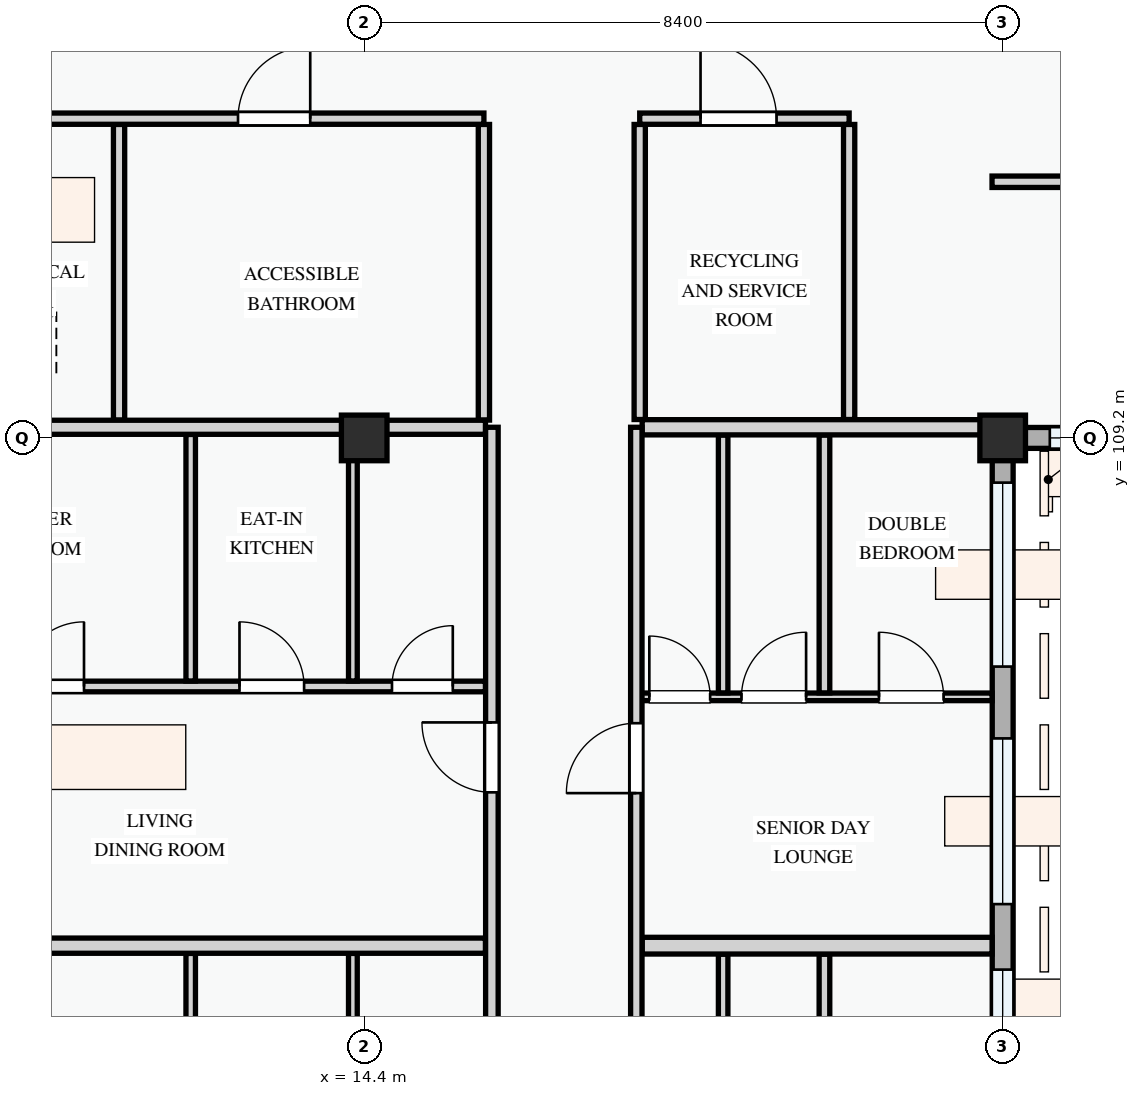
"""IFC4 building model, lengths in metres.
Left out: names, types, materials, properties, quantities, classifications, styles, units other than length and angle.
Written with IfcOpenShell. Run it as: python <this file> out.ifc"""

import sys

from ifc_helpers import new_model, si_unit, direction, frame, frame_2d, origin, origin_2d, place, context, subcontext, project, spatial, rectangle, extrude, element, fill, save


model = new_model("IFC4")
c1 = context("Model", 3, precision=1e-05, world=origin(), true_north=direction((0.0, 1.0)))
c2 = subcontext(c1, "Body", "Model", "MODEL_VIEW")
j1 = project(units=[si_unit("LENGTHUNIT", "METRE"), si_unit("PLANEANGLEUNIT", "RADIAN")], contexts=[c1])
p1 = place(None, origin())
s1 = spatial("IfcSite", under=j1, at=p1, CompositionType="ELEMENT")
p2 = place(p1, origin())
s2 = spatial("IfcBuilding", under=s1, at=p2, CompositionType="ELEMENT")
p3 = place(p2, frame((0.0, 0.0, 31.2)))
s3 = spatial("IfcBuildingStorey", under=s2, at=p3, CompositionType="ELEMENT", Elevation=31.2)
for number, where, z_axis, x_axis in (
    (1, (14.4, 109.2, 0.0), (0.0, 0.0, 1.0), (1.0, 0.0, 0.0)),
    (2, (22.8, 109.2, 0.0), (0.0, 0.0, 1.0), (1.0, 0.0, 0.0)),
):
    element("IfcColumn", number, at=place(p3, frame(where, z_axis=z_axis, x_axis=x_axis)), inside=s3, PredefinedType="COLUMN", context=c2, shape_type="SweptSolid", body=[
        extrude(rectangle(XDim=0.6, YDim=0.6, at=origin_2d()), origin(), (0.0, 0.0, 1.0), 3.3),
    ])
p4 = place(p3, frame((22.8, 109.2, 0.0), z_axis=(0.0, 0.0, 1.0), x_axis=(1.0, 0.0, 0.0)))
e3 = element("IfcWall", 3, at=p4, inside=s3, PredefinedType="STANDARD", context=c2, shape_type="SweptSolid", body=[
    extrude(rectangle(XDim=6.0, YDim=0.275, at=frame_2d((3.0, 0.0))), origin(), (0.0, 0.0, 1.0), 2.525),
])
p5 = place(p4, frame((0.62, 0.0, 0.78)))
e4 = element("IfcOpeningElement", 4, at=p5, cuts=e3, PredefinedType="OPENING", context=c2, shape_type="SweptSolid", body=[
    extrude(rectangle(XDim=1.3, YDim=1.4, at=frame_2d((0.65, 0.7))), frame((0.0, 0.147, 0.0), z_axis=(0.0, -1.0, 0.0), x_axis=(1.0, 0.0, 0.0)), (0.0, 0.0, 1.0), 0.295),
])
p6 = place(p4, frame((3.155, 0.0, 0.78)))
e5 = element("IfcOpeningElement", 5, at=p6, cuts=e3, PredefinedType="OPENING", context=c2, shape_type="SweptSolid", body=[
    extrude(rectangle(XDim=1.85, YDim=1.6, at=frame_2d((0.925, 0.8))), frame((0.0, 0.147, 0.0), z_axis=(0.0, -1.0, 0.0), x_axis=(1.0, 0.0, 0.0)), (0.0, 0.0, 1.0), 0.295),
])
p7 = place(p3, frame((22.8, 100.8, 0.0), z_axis=(0.0, 0.0, 1.0), x_axis=(0.0, 1.0, 0.0)))
e6 = element("IfcWall", 6, at=p7, inside=s3, PredefinedType="STANDARD", context=c2, shape_type="SweptSolid", body=[
    extrude(rectangle(XDim=8.4, YDim=0.275, at=frame_2d((4.2, 0.0))), origin(), (0.0, 0.0, 1.0), 2.425),
])
p8 = place(p7, frame((0.505, 0.0, 0.78)))
e7 = element("IfcOpeningElement", 7, at=p8, cuts=e6, PredefinedType="OPENING", context=c2, shape_type="SweptSolid", body=[
    extrude(rectangle(XDim=0.9, YDim=1.2, at=frame_2d((0.45, 0.6))), frame((0.0, 0.147, 0.0), z_axis=(0.0, -1.0, 0.0), x_axis=(1.0, 0.0, 0.0)), (0.0, 0.0, 1.0), 0.295),
])
p9 = place(p7, frame((2.267, 0.0, 0.78)))
e8 = element("IfcOpeningElement", 8, at=p9, cuts=e6, PredefinedType="OPENING", context=c2, shape_type="SweptSolid", body=[
    extrude(rectangle(XDim=2.18, YDim=1.48, at=frame_2d((1.09, 0.74))), frame((0.0, 0.147, 0.0), z_axis=(0.0, -1.0, 0.0), x_axis=(1.0, 0.0, 0.0)), (0.0, 0.0, 1.0), 0.295),
])
p10 = place(p7, frame((5.392, 0.0, 0.78)))
e9 = element("IfcOpeningElement", 9, at=p10, cuts=e6, PredefinedType="OPENING", context=c2, shape_type="SweptSolid", body=[
    extrude(rectangle(XDim=2.42, YDim=1.52, at=frame_2d((1.21, 0.76))), frame((0.0, 0.147, 0.0), z_axis=(0.0, -1.0, 0.0), x_axis=(1.0, 0.0, 0.0)), (0.0, 0.0, 1.0), 0.295),
])
for number, where, z_axis, x_axis in (
    (10, (11.175, 113.324, 0.0), (0.0, 0.0, 1.0), (0.0, -1.0, 0.0)),
    (11, (15.975, 113.324, 0.0), (0.0, 0.0, 1.0), (0.0, -1.0, 0.0)),
):
    element("IfcWall", number, at=place(p3, frame(where, z_axis=z_axis, x_axis=x_axis)), inside=s3, PredefinedType="PARTITIONING", context=c2, shape_type="SweptSolid", body=[
        extrude(rectangle(XDim=3.889, YDim=0.148, at=frame_2d((1.945, 0.0))), origin(), (0.0, 0.0, 1.0), 3.0),
    ])
for number, where, z_axis, x_axis in (
    (12, (18.025, 113.324, 0.0), (0.0, 0.0, 1.0), (0.0, -1.0, 0.0)),
    (13, (20.78, 113.324, 0.0), (0.0, 0.0, 1.0), (0.0, -1.0, 0.0)),
):
    element("IfcWall", number, at=place(p3, frame(where, z_axis=z_axis, x_axis=x_axis)), inside=s3, PredefinedType="PARTITIONING", context=c2, shape_type="SweptSolid", body=[
        extrude(rectangle(XDim=3.882, YDim=0.148, at=frame_2d((1.941, 0.0))), origin(), (0.0, 0.0, 1.0), 3.0),
    ])
p11 = place(p3, frame((8.54, 113.4, 0.0), z_axis=(0.0, 0.0, 1.0), x_axis=(1.0, 0.0, 0.0)))
e14 = element("IfcWall", 14, at=p11, inside=s3, PredefinedType="PARTITIONING", context=c2, shape_type="SweptSolid", body=[
    extrude(rectangle(XDim=7.435, YDim=0.148, at=frame_2d((3.718, 0.0))), origin(), (0.0, 0.0, 1.0), 3.0),
])
p12 = place(p11, frame((0.65, 0.0, 0.0)))
e15 = element("IfcOpeningElement", 15, at=p12, cuts=e14, PredefinedType="OPENING", context=c2, shape_type="SweptSolid", body=[
    extrude(rectangle(XDim=0.9, YDim=2.1, at=frame_2d((0.45, 1.05))), frame((0.0, 0.084, 0.0), z_axis=(0.0, -1.0, 0.0), x_axis=(1.0, 0.0, 0.0)), (0.0, 0.0, 1.0), 0.168),
])
p13 = place(p11, frame((4.2, 0.0, 0.0)))
e16 = element("IfcOpeningElement", 16, at=p13, cuts=e14, PredefinedType="OPENING", context=c2, shape_type="SweptSolid", body=[
    extrude(rectangle(XDim=0.95, YDim=2.1, at=frame_2d((0.475, 1.05))), frame((0.0, 0.084, 0.0), z_axis=(0.0, -1.0, 0.0), x_axis=(1.0, 0.0, 0.0)), (0.0, 0.0, 1.0), 0.168),
])
p14 = place(p3, frame((18.025, 113.4, 0.0), z_axis=(0.0, 0.0, 1.0), x_axis=(1.0, 0.0, 0.0)))
e17 = element("IfcWall", 17, at=p14, inside=s3, PredefinedType="PARTITIONING", context=c2, shape_type="SweptSolid", body=[
    extrude(rectangle(XDim=2.755, YDim=0.148, at=frame_2d((1.377, 0.0))), origin(), (0.0, 0.0, 1.0), 3.0),
])
p15 = place(p14, frame((0.8, 0.0, 0.0)))
e18 = element("IfcOpeningElement", 18, at=p15, cuts=e17, PredefinedType="OPENING", context=c2, shape_type="SweptSolid", body=[
    extrude(rectangle(XDim=1.0, YDim=2.15, at=frame_2d((0.5, 1.075))), frame((0.0, 0.084, 0.0), z_axis=(0.0, -1.0, 0.0), x_axis=(1.0, 0.0, 0.0)), (0.0, 0.0, 1.0), 0.168),
])
p16 = place(p3, frame((22.66, 112.57, 0.0), z_axis=(0.0, 0.0, 1.0), x_axis=(1.0, 0.0, 0.0)))
e19 = element("IfcWall", 19, at=p16, inside=s3, PredefinedType="PARTITIONING", context=c2, shape_type="SweptSolid", body=[
    extrude(rectangle(XDim=2.406, YDim=0.15, at=frame_2d((1.203, 0.0))), origin(), (0.0, 0.0, 1.0), 3.0),
])
p17 = place(p3, frame((12.118, 97.852, 0.0), z_axis=(0.0, 0.0, 1.0), x_axis=(0.0, 1.0, 0.0)))
e20 = element("IfcWall", 20, at=p17, inside=s3, PredefinedType="PARTITIONING", context=c2, shape_type="SweptSolid", body=[
    extrude(rectangle(XDim=4.566, YDim=0.125, at=frame_2d((2.283, 0.0))), origin(), (0.0, 0.0, 1.0), 3.0),
])
p18 = place(p3, frame((14.251, 97.852, 0.0), z_axis=(0.0, 0.0, 1.0), x_axis=(0.0, 1.0, 0.0)))
e21 = element("IfcWall", 21, at=p18, inside=s3, PredefinedType="PARTITIONING", context=c2, shape_type="SweptSolid", body=[
    extrude(rectangle(XDim=4.566, YDim=0.115, at=frame_2d((2.283, 0.0))), origin(), (0.0, 0.0, 1.0), 2.425),
])
p19 = place(p3, frame((20.455, 97.642, 0.0), z_axis=(0.0, 0.0, 1.0), x_axis=(0.0, 1.0, 0.0)))
e22 = element("IfcWall", 22, at=p19, inside=s3, PredefinedType="PARTITIONING", context=c2, shape_type="SweptSolid", body=[
    extrude(rectangle(XDim=4.766, YDim=0.14, at=frame_2d((2.383, 0.0))), origin(), (0.0, 0.0, 1.0), 3.0),
])
p20 = place(p3, frame((19.122, 97.642, 0.0), z_axis=(0.0, 0.0, 1.0), x_axis=(0.0, 1.0, 0.0)))
e23 = element("IfcWall", 23, at=p20, inside=s3, PredefinedType="PARTITIONING", context=c2, shape_type="SweptSolid", body=[
    extrude(rectangle(XDim=4.766, YDim=0.125, at=frame_2d((2.383, 0.0))), origin(), (0.0, 0.0, 1.0), 3.0),
])
p21 = place(p3, frame((8.54, 105.93, 0.0), z_axis=(0.0, 0.0, 1.0), x_axis=(1.0, 0.0, 0.0)))
e24 = element("IfcWall", 24, at=p21, inside=s3, PredefinedType="PARTITIONING", context=c2, shape_type="SweptSolid", body=[
    extrude(rectangle(XDim=7.456, YDim=0.14, at=frame_2d((3.728, 0.0))), origin(), (0.0, 0.0, 1.0), 3.0),
])
p22 = place(p21, frame((1.324, 0.0, 0.0)))
e25 = element("IfcOpeningElement", 25, at=p22, cuts=e24, PredefinedType="OPENING", context=c2, shape_type="SweptSolid", body=[
    extrude(rectangle(XDim=0.85, YDim=2.1, at=frame_2d((0.425, 1.05))), frame((0.0, 0.08, 0.0), z_axis=(0.0, -1.0, 0.0), x_axis=(1.0, 0.0, 0.0)), (0.0, 0.0, 1.0), 0.16),
])
p23 = place(p21, frame((4.22, 0.0, 0.0)))
e26 = element("IfcOpeningElement", 26, at=p23, cuts=e24, PredefinedType="OPENING", context=c2, shape_type="SweptSolid", body=[
    extrude(rectangle(XDim=0.85, YDim=2.1, at=frame_2d((0.425, 1.05))), frame((0.0, 0.08, 0.0), z_axis=(0.0, -1.0, 0.0), x_axis=(1.0, 0.0, 0.0)), (0.0, 0.0, 1.0), 0.16),
])
p24 = place(p21, frame((6.226, 0.0, 0.0)))
e27 = element("IfcOpeningElement", 27, at=p24, cuts=e24, PredefinedType="OPENING", context=c2, shape_type="SweptSolid", body=[
    extrude(rectangle(XDim=0.8, YDim=2.1, at=frame_2d((0.4, 1.05))), frame((0.0, 0.08, 0.0), z_axis=(0.0, -1.0, 0.0), x_axis=(1.0, 0.0, 0.0)), (0.0, 0.0, 1.0), 0.16),
])
p25 = place(p3, frame((12.118, 106.002, 0.0), z_axis=(0.0, 0.0, 1.0), x_axis=(0.0, 1.0, 0.0)))
e28 = element("IfcWall", 28, at=p25, inside=s3, PredefinedType="PARTITIONING", context=c2, shape_type="SweptSolid", body=[
    extrude(rectangle(XDim=3.244, YDim=0.125, at=frame_2d((1.622, 0.0))), origin(), (0.0, 0.0, 1.0), 3.0),
])
p26 = place(p3, frame((14.251, 106.002, 0.0), z_axis=(0.0, 0.0, 1.0), x_axis=(0.0, 1.0, 0.0)))
e29 = element("IfcWall", 29, at=p26, inside=s3, PredefinedType="PARTITIONING", context=c2, shape_type="SweptSolid", body=[
    extrude(rectangle(XDim=3.244, YDim=0.115, at=frame_2d((1.622, 0.0))), origin(), (0.0, 0.0, 1.0), 2.425),
])
p27 = place(p3, frame((17.98, 105.794, 0.0), z_axis=(0.0, 0.0, 1.0), x_axis=(1.0, 0.0, 0.0)))
e30 = element("IfcWall", 30, at=p27, inside=s3, PredefinedType="PARTITIONING", context=c2, shape_type="SweptSolid", body=[
    extrude(rectangle(XDim=4.68, YDim=0.1, at=frame_2d((2.34, 0.0))), origin(), (0.0, 0.0, 1.0), 3.0),
])
p28 = place(p27, frame((0.171, 0.0, 0.0)))
e31 = element("IfcOpeningElement", 31, at=p28, cuts=e30, PredefinedType="OPENING", context=c2, shape_type="SweptSolid", body=[
    extrude(rectangle(XDim=0.8, YDim=2.1, at=frame_2d((0.4, 1.05))), frame((0.0, 0.06, 0.0), z_axis=(0.0, -1.0, 0.0), x_axis=(1.0, 0.0, 0.0)), (0.0, 0.0, 1.0), 0.12),
])
p29 = place(p27, frame((1.384, 0.0, 0.0)))
e32 = element("IfcOpeningElement", 32, at=p29, cuts=e30, PredefinedType="OPENING", context=c2, shape_type="SweptSolid", body=[
    extrude(rectangle(XDim=0.85, YDim=2.1, at=frame_2d((0.425, 1.05))), frame((0.0, 0.06, 0.0), z_axis=(0.0, -1.0, 0.0), x_axis=(1.0, 0.0, 0.0)), (0.0, 0.0, 1.0), 0.12),
])
p30 = place(p27, frame((3.193, 0.0, 0.0)))
e33 = element("IfcOpeningElement", 33, at=p30, cuts=e30, PredefinedType="OPENING", context=c2, shape_type="SweptSolid", body=[
    extrude(rectangle(XDim=0.85, YDim=2.1, at=frame_2d((0.425, 1.05))), frame((0.0, 0.06, 0.0), z_axis=(0.0, -1.0, 0.0), x_axis=(1.0, 0.0, 0.0)), (0.0, 0.0, 1.0), 0.12),
])
p31 = place(p3, frame((20.455, 105.846, 0.0), z_axis=(0.0, 0.0, 1.0), x_axis=(0.0, 1.0, 0.0)))
e34 = element("IfcWall", 34, at=p31, inside=s3, PredefinedType="PARTITIONING", context=c2, shape_type="SweptSolid", body=[
    extrude(rectangle(XDim=3.392, YDim=0.14, at=frame_2d((1.696, 0.0))), origin(), (0.0, 0.0, 1.0), 3.0),
])
p32 = place(p3, frame((19.122, 105.846, 0.0), z_axis=(0.0, 0.0, 1.0), x_axis=(0.0, 1.0, 0.0)))
e35 = element("IfcWall", 35, at=p32, inside=s3, PredefinedType="PARTITIONING", context=c2, shape_type="SweptSolid", body=[
    extrude(rectangle(XDim=3.392, YDim=0.125, at=frame_2d((1.696, 0.0))), origin(), (0.0, 0.0, 1.0), 3.0),
])
p33 = place(p3, frame((8.54, 102.52, 0.0), z_axis=(0.0, 0.0, 1.0), x_axis=(1.0, 0.0, 0.0)))
e36 = element("IfcWall", 36, at=p33, inside=s3, PredefinedType="PARTITIONING", context=c2, shape_type="SweptSolid", body=[
    extrude(rectangle(XDim=7.456, YDim=0.2, at=frame_2d((3.728, 0.0))), origin(), (0.0, 0.0, 1.0), 3.0),
])
p34 = place(p3, frame((18.057, 102.52, 0.0), z_axis=(0.0, 0.0, 1.0), x_axis=(1.0, 0.0, 0.0)))
e37 = element("IfcWall", 37, at=p34, inside=s3, PredefinedType="PARTITIONING", context=c2, shape_type="SweptSolid", body=[
    extrude(rectangle(XDim=4.604, YDim=0.22, at=frame_2d((2.302, 0.0))), origin(), (0.0, 0.0, 1.0), 3.0),
])
p35 = place(p3, frame((8.54, 109.34, 0.0), z_axis=(0.0, 0.0, 1.0), x_axis=(1.0, 0.0, 0.0)))
e38 = element("IfcWall", 38, at=p35, inside=s3, PredefinedType="PARTITIONING", context=c2, shape_type="SweptSolid", body=[
    extrude(rectangle(XDim=7.456, YDim=0.185, at=frame_2d((3.728, 0.0))), origin(), (0.0, 0.0, 1.0), 2.375),
])
p36 = place(p3, frame((18.057, 109.34, 0.0), z_axis=(0.0, 0.0, 1.0), x_axis=(1.0, 0.0, 0.0)))
e39 = element("IfcWall", 39, at=p36, inside=s3, PredefinedType="PARTITIONING", context=c2, shape_type="SweptSolid", body=[
    extrude(rectangle(XDim=4.683, YDim=0.2, at=frame_2d((2.342, 0.0))), origin(), (0.0, 0.0, 1.0), 2.375),
])
p37 = place(p3, frame((16.08, 86.46, 0.0), z_axis=(0.0, 0.0, 1.0), x_axis=(0.0, 1.0, 0.0)))
e40 = element("IfcWall", 40, at=p37, inside=s3, PredefinedType="PARTITIONING", context=c2, shape_type="SweptSolid", body=[
    extrude(rectangle(XDim=22.88, YDim=0.165, at=frame_2d((11.44, 0.0))), origin(), (0.0, 0.0, 1.0), 3.0),
])
p38 = place(p37, frame((2.08, 0.0, 0.0)))
e41 = element("IfcOpeningElement", 41, at=p38, cuts=e40, PredefinedType="OPENING", context=c2, shape_type="SweptSolid", body=[
    extrude(rectangle(XDim=0.92, YDim=2.1, at=frame_2d((0.46, 1.05))), frame((0.0, 0.093, 0.0), z_axis=(0.0, -1.0, 0.0), x_axis=(1.0, 0.0, 0.0)), (0.0, 0.0, 1.0), 0.185),
])
p39 = place(p37, frame((10.11, 0.0, 0.0)))
e42 = element("IfcOpeningElement", 42, at=p39, cuts=e40, PredefinedType="OPENING", context=c2, shape_type="SweptSolid", body=[
    extrude(rectangle(XDim=0.92, YDim=2.1, at=frame_2d((0.46, 1.05))), frame((0.0, 0.093, 0.0), z_axis=(0.0, -1.0, 0.0), x_axis=(1.0, 0.0, 0.0)), (0.0, 0.0, 1.0), 0.185),
])
p40 = place(p37, frame((18.077, 0.0, 0.0)))
e43 = element("IfcOpeningElement", 43, at=p40, cuts=e40, PredefinedType="OPENING", context=c2, shape_type="SweptSolid", body=[
    extrude(rectangle(XDim=0.92, YDim=2.1, at=frame_2d((0.46, 1.05))), frame((0.0, 0.093, 0.0), z_axis=(0.0, -1.0, 0.0), x_axis=(1.0, 0.0, 0.0)), (0.0, 0.0, 1.0), 0.185),
])
p41 = place(p3, frame((17.98, 86.46, 0.0), z_axis=(0.0, 0.0, 1.0), x_axis=(0.0, 1.0, 0.0)))
e44 = element("IfcWall", 44, at=p41, inside=s3, PredefinedType="PARTITIONING", context=c2, shape_type="SweptSolid", body=[
    extrude(rectangle(XDim=22.88, YDim=0.15, at=frame_2d((11.44, 0.0))), origin(), (0.0, 0.0, 1.0), 3.0),
])
p42 = place(p41, frame((1.948, 0.0, 0.0)))
e45 = element("IfcOpeningElement", 45, at=p42, cuts=e44, PredefinedType="OPENING", context=c2, shape_type="SweptSolid", body=[
    extrude(rectangle(XDim=0.96, YDim=2.12, at=frame_2d((0.48, 1.06))), frame((0.0, 0.085, 0.0), z_axis=(0.0, -1.0, 0.0), x_axis=(1.0, 0.0, 0.0)), (0.0, 0.0, 1.0), 0.17),
])
p43 = place(p41, frame((9.92, 0.0, 0.0)))
e46 = element("IfcOpeningElement", 46, at=p43, cuts=e44, PredefinedType="OPENING", context=c2, shape_type="SweptSolid", body=[
    extrude(rectangle(XDim=0.92, YDim=2.1, at=frame_2d((0.46, 1.05))), frame((0.0, 0.085, 0.0), z_axis=(0.0, -1.0, 0.0), x_axis=(1.0, 0.0, 0.0)), (0.0, 0.0, 1.0), 0.17),
])
p44 = place(p41, frame((18.067, 0.0, 0.0)))
e47 = element("IfcOpeningElement", 47, at=p44, cuts=e44, PredefinedType="OPENING", context=c2, shape_type="SweptSolid", body=[
    extrude(rectangle(XDim=0.92, YDim=2.1, at=frame_2d((0.46, 1.05))), frame((0.0, 0.085, 0.0), z_axis=(0.0, -1.0, 0.0), x_axis=(1.0, 0.0, 0.0)), (0.0, 0.0, 1.0), 0.17),
])
p45 = place(p5, origin())
e48 = element("IfcWindow", 48, at=p45, inside=s3, PartitioningType="SINGLE_PANEL", PredefinedType="WINDOW", context=c2, shape_type="SweptSolid", body=[
    extrude(rectangle(XDim=1.3, YDim=1.4, at=frame_2d((0.65, 0.7))), frame((0.0, 0.03, 0.0), z_axis=(0.0, -1.0, 0.0), x_axis=(1.0, 0.0, 0.0)), (0.0, 0.0, 1.0), 0.06),
])
fill(e4, e48)
p46 = place(p8, origin())
e49 = element("IfcWindow", 49, at=p46, inside=s3, PartitioningType="SINGLE_PANEL", PredefinedType="WINDOW", context=c2, shape_type="SweptSolid", body=[
    extrude(rectangle(XDim=0.9, YDim=1.2, at=frame_2d((0.45, 0.6))), frame((0.0, 0.03, 0.0), z_axis=(0.0, -1.0, 0.0), x_axis=(1.0, 0.0, 0.0)), (0.0, 0.0, 1.0), 0.06),
])
fill(e7, e49)
p47 = place(p9, origin())
e50 = element("IfcWindow", 50, at=p47, inside=s3, PartitioningType="DOUBLE_PANEL_VERTICAL", PredefinedType="WINDOW", context=c2, shape_type="SweptSolid", body=[
    extrude(rectangle(XDim=2.18, YDim=1.48, at=frame_2d((1.09, 0.74))), frame((0.0, 0.03, 0.0), z_axis=(0.0, -1.0, 0.0), x_axis=(1.0, 0.0, 0.0)), (0.0, 0.0, 1.0), 0.06),
])
fill(e8, e50)
p48 = place(p10, origin())
e51 = element("IfcWindow", 51, at=p48, inside=s3, PartitioningType="DOUBLE_PANEL_VERTICAL", PredefinedType="WINDOW", context=c2, shape_type="SweptSolid", body=[
    extrude(rectangle(XDim=2.42, YDim=1.52, at=frame_2d((1.21, 0.76))), frame((0.0, 0.03, 0.0), z_axis=(0.0, -1.0, 0.0), x_axis=(1.0, 0.0, 0.0)), (0.0, 0.0, 1.0), 0.06),
])
fill(e9, e51)
p49 = place(p13, origin())
e52 = element("IfcDoor", 52, at=p49, inside=s3, OperationType="SINGLE_SWING_RIGHT", PredefinedType="DOOR", context=c2, shape_type="SweptSolid", body=[
    extrude(rectangle(XDim=0.95, YDim=2.1, at=frame_2d((0.475, 1.05))), frame((0.0, 0.025, 0.0), z_axis=(0.0, -1.0, 0.0), x_axis=(1.0, 0.0, 0.0)), (0.0, 0.0, 1.0), 0.05),
])
fill(e16, e52)
p50 = place(p15, origin())
e53 = element("IfcDoor", 53, at=p50, inside=s3, OperationType="SINGLE_SWING_LEFT", PredefinedType="DOOR", context=c2, shape_type="SweptSolid", body=[
    extrude(rectangle(XDim=1.0, YDim=2.15, at=frame_2d((0.5, 1.075))), frame((0.0, 0.025, 0.0), z_axis=(0.0, -1.0, 0.0), x_axis=(1.0, 0.0, 0.0)), (0.0, 0.0, 1.0), 0.05),
])
fill(e18, e53)
p51 = place(p22, origin())
e54 = element("IfcDoor", 54, at=p51, inside=s3, OperationType="SINGLE_SWING_RIGHT", PredefinedType="DOOR", context=c2, shape_type="SweptSolid", body=[
    extrude(rectangle(XDim=0.85, YDim=2.1, at=frame_2d((0.425, 1.05))), frame((0.0, 0.025, 0.0), z_axis=(0.0, -1.0, 0.0), x_axis=(1.0, 0.0, 0.0)), (0.0, 0.0, 1.0), 0.05),
])
fill(e25, e54)
p52 = place(p23, origin())
e55 = element("IfcDoor", 55, at=p52, inside=s3, OperationType="SINGLE_SWING_LEFT", PredefinedType="DOOR", context=c2, shape_type="SweptSolid", body=[
    extrude(rectangle(XDim=0.85, YDim=2.1, at=frame_2d((0.425, 1.05))), frame((0.0, 0.025, 0.0), z_axis=(0.0, -1.0, 0.0), x_axis=(1.0, 0.0, 0.0)), (0.0, 0.0, 1.0), 0.05),
])
fill(e26, e55)
p53 = place(p24, origin())
e56 = element("IfcDoor", 56, at=p53, inside=s3, OperationType="SINGLE_SWING_RIGHT", PredefinedType="DOOR", context=c2, shape_type="SweptSolid", body=[
    extrude(rectangle(XDim=0.8, YDim=2.1, at=frame_2d((0.4, 1.05))), frame((0.0, 0.025, 0.0), z_axis=(0.0, -1.0, 0.0), x_axis=(1.0, 0.0, 0.0)), (0.0, 0.0, 1.0), 0.05),
])
fill(e27, e56)
p54 = place(p28, origin())
e57 = element("IfcDoor", 57, at=p54, inside=s3, OperationType="SINGLE_SWING_LEFT", PredefinedType="DOOR", context=c2, shape_type="SweptSolid", body=[
    extrude(rectangle(XDim=0.8, YDim=2.1, at=frame_2d((0.4, 1.05))), frame((0.0, 0.025, 0.0), z_axis=(0.0, -1.0, 0.0), x_axis=(1.0, 0.0, 0.0)), (0.0, 0.0, 1.0), 0.05),
])
fill(e31, e57)
p55 = place(p29, origin())
e58 = element("IfcDoor", 58, at=p55, inside=s3, OperationType="SINGLE_SWING_RIGHT", PredefinedType="DOOR", context=c2, shape_type="SweptSolid", body=[
    extrude(rectangle(XDim=0.85, YDim=2.1, at=frame_2d((0.425, 1.05))), frame((0.0, 0.025, 0.0), z_axis=(0.0, -1.0, 0.0), x_axis=(1.0, 0.0, 0.0)), (0.0, 0.0, 1.0), 0.05),
])
fill(e32, e58)
p56 = place(p30, origin())
e59 = element("IfcDoor", 59, at=p56, inside=s3, OperationType="SINGLE_SWING_LEFT", PredefinedType="DOOR", context=c2, shape_type="SweptSolid", body=[
    extrude(rectangle(XDim=0.85, YDim=2.1, at=frame_2d((0.425, 1.05))), frame((0.0, 0.025, 0.0), z_axis=(0.0, -1.0, 0.0), x_axis=(1.0, 0.0, 0.0)), (0.0, 0.0, 1.0), 0.05),
])
fill(e33, e59)
p57 = place(p40, origin())
e60 = element("IfcDoor", 60, at=p57, inside=s3, OperationType="SINGLE_SWING_RIGHT", PredefinedType="DOOR", context=c2, shape_type="SweptSolid", body=[
    extrude(rectangle(XDim=0.92, YDim=2.1, at=frame_2d((0.46, 1.05))), frame((0.0, 0.025, 0.0), z_axis=(0.0, -1.0, 0.0), x_axis=(1.0, 0.0, 0.0)), (0.0, 0.0, 1.0), 0.05),
])
fill(e43, e60)
p58 = place(p44, origin())
e61 = element("IfcDoor", 61, at=p58, inside=s3, OperationType="SINGLE_SWING_LEFT", PredefinedType="DOOR", context=c2, shape_type="SweptSolid", body=[
    extrude(rectangle(XDim=0.92, YDim=2.1, at=frame_2d((0.46, 1.05))), frame((0.0, 0.025, 0.0), z_axis=(0.0, -1.0, 0.0), x_axis=(1.0, 0.0, 0.0)), (0.0, 0.0, 1.0), 0.05),
])
fill(e47, e61)
save(model, sys.argv[1])
